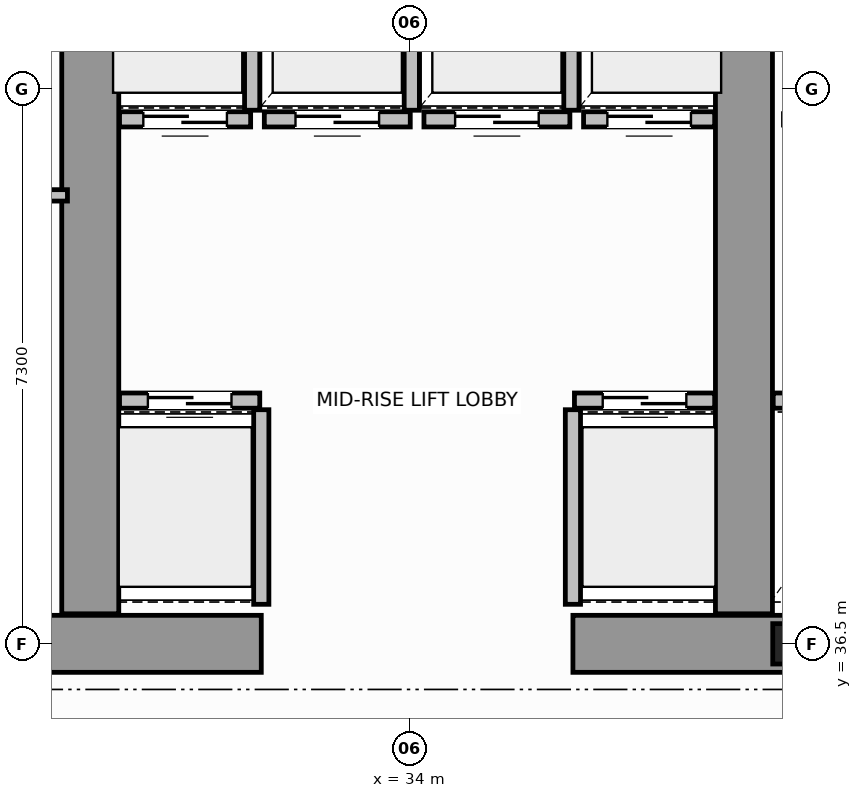
"""IFC4 building model, lengths in metres.
Left out: names, types, materials, properties, quantities, classifications, styles, units other than length and angle.
Written with IfcOpenShell. Run it as: python <this file> out.ifc"""

import sys

from ifc_helpers import new_model, si_unit, direction, frame, frame_2d, origin, origin_2d, place, context, subcontext, project, spatial, rectangle, i_section, extrude, source, transform, mapped, element, fill, save


model = new_model("IFC4")
c1 = context("Model", 3, precision=1e-05, world=origin(), true_north=direction((0.0, 1.0)))
c2 = subcontext(c1, "Body", "Model", "MODEL_VIEW")
j1 = project(units=[si_unit("LENGTHUNIT", "METRE"), si_unit("PLANEANGLEUNIT", "RADIAN")], contexts=[c1])
p1 = place(None, origin())
s1 = spatial("IfcSite", under=j1, at=p1, CompositionType="ELEMENT")
p2 = place(p1, origin())
s2 = spatial("IfcBuilding", under=s1, at=p2, CompositionType="ELEMENT")
p3 = place(p2, frame((0.0, 0.0, 137.6)))
s3 = spatial("IfcBuildingStorey", under=s2, at=p3, CompositionType="ELEMENT", Elevation=137.6)
m1 = source(origin(), c2, "Body", "SweptSolid", [
    extrude(i_section(OverallWidth=0.442, OverallDepth=0.531, WebThickness=0.065, FlangeThickness=0.076, FilletRadius=0.015, at=origin_2d()), origin(), (0.0, 0.0, 1.0), 3.8),
])
p4 = place(p3, frame((39.0, 36.5, 0.0), z_axis=(0.0, 0.0, 1.0), x_axis=(1.0, 0.0, 0.0)))
e1 = element("IfcColumn", 1, at=p4, inside=s3, PredefinedType="COLUMN", context=c2, shape_type="MappedRepresentation", body=[
    mapped(m1, transform((0.0, 0.0, 0.0), scale=1.0)),
])
for number, where, z_axis, x_axis in (
    (2, (27.55, 36.5, 0.0), (0.0, 0.0, 1.0), (1.0, 0.0, 0.0)),
    (3, (36.15, 36.5, 0.0), (0.0, 0.0, 1.0), (1.0, 0.0, 0.0)),
):
    element("IfcWall", number, at=place(p3, frame(where, z_axis=z_axis, x_axis=x_axis)), inside=s3, PredefinedType="SHEAR", context=c2, shape_type="SweptSolid", body=[
        extrude(rectangle(XDim=4.5, YDim=0.75, at=frame_2d((2.25, 0.0))), origin(), (0.0, 0.0, 1.0), 3.8),
    ])
for number, where, z_axis, x_axis in (
    (4, (29.8, 36.895, 0.0), (0.0, 0.0, 1.0), (0.0, 1.0, 0.0)),
    (5, (38.4, 36.895, 0.0), (0.0, 0.0, 1.0), (0.0, 1.0, 0.0)),
):
    element("IfcWall", number, at=place(p3, frame(where, z_axis=z_axis, x_axis=x_axis)), inside=s3, PredefinedType="SHEAR", context=c2, shape_type="SweptSolid", body=[
        extrude(rectangle(XDim=9.305, YDim=0.75, at=frame_2d((4.652, 0.0))), origin(), (0.0, 0.0, 1.0), 3.8),
    ])
p5 = place(p3, frame((30.185, 39.7, 0.0), z_axis=(0.0, 0.0, 1.0), x_axis=(1.0, 0.0, 0.0)))
e6 = element("IfcWall", 6, at=p5, inside=s3, PredefinedType="SOLIDWALL", context=c2, shape_type="SweptSolid", body=[
    extrude(rectangle(XDim=1.845, YDim=0.2, at=frame_2d((0.922, 0.0))), origin(), (0.0, 0.0, 1.0), 3.58),
])
p6 = place(p5, frame((0.373, 0.0, 0.0)))
e7 = element("IfcOpeningElement", 7, at=p6, cuts=e6, PredefinedType="OPENING", context=c2, shape_type="SweptSolid", body=[
    extrude(rectangle(XDim=1.1, YDim=2.15, at=frame_2d((0.55, 1.075))), frame((0.0, 0.11, 0.0), z_axis=(0.0, -1.0, 0.0), x_axis=(1.0, 0.0, 0.0)), (0.0, 0.0, 1.0), 0.22),
])
p7 = place(p3, frame((32.05, 37.02, 0.0), z_axis=(0.0, 0.0, 1.0), x_axis=(0.0, 1.0, 0.0)))
e8 = element("IfcWall", 8, at=p7, inside=s3, PredefinedType="SOLIDWALL", context=c2, shape_type="SweptSolid", body=[
    extrude(rectangle(XDim=2.56, YDim=0.2, at=frame_2d((1.28, 0.0))), origin(), (0.0, 0.0, 1.0), 3.58),
])
p8 = place(p3, frame((36.17, 39.7, 0.0), z_axis=(0.0, 0.0, 1.0), x_axis=(1.0, 0.0, 0.0)))
e9 = element("IfcWall", 9, at=p8, inside=s3, PredefinedType="SOLIDWALL", context=c2, shape_type="SweptSolid", body=[
    extrude(rectangle(XDim=1.845, YDim=0.2, at=frame_2d((0.922, 0.0))), origin(), (0.0, 0.0, 1.0), 3.58),
])
p9 = place(p8, frame((0.372, 0.0, 0.0)))
e10 = element("IfcOpeningElement", 10, at=p9, cuts=e9, PredefinedType="OPENING", context=c2, shape_type="SweptSolid", body=[
    extrude(rectangle(XDim=1.1, YDim=2.15, at=frame_2d((0.55, 1.075))), frame((0.0, 0.11, 0.0), z_axis=(0.0, -1.0, 0.0), x_axis=(1.0, 0.0, 0.0)), (0.0, 0.0, 1.0), 0.22),
])
p10 = place(p3, frame((36.15, 37.02, 0.0), z_axis=(0.0, 0.0, 1.0), x_axis=(0.0, 1.0, 0.0)))
e11 = element("IfcWall", 11, at=p10, inside=s3, PredefinedType="SOLIDWALL", context=c2, shape_type="SweptSolid", body=[
    extrude(rectangle(XDim=2.56, YDim=0.2, at=frame_2d((1.28, 0.0))), origin(), (0.0, 0.0, 1.0), 3.58),
])
p11 = place(p3, frame((30.185, 43.4, 0.0), z_axis=(0.0, 0.0, 1.0), x_axis=(1.0, 0.0, 0.0)))
e12 = element("IfcWall", 12, at=p11, inside=s3, PredefinedType="SOLIDWALL", context=c2, shape_type="SweptSolid", body=[
    extrude(rectangle(XDim=1.725, YDim=0.2, at=frame_2d((0.862, 0.0))), origin(), (0.0, 0.0, 1.0), 3.58),
])
p12 = place(p11, frame((0.313, 0.0, 0.0)))
e13 = element("IfcOpeningElement", 13, at=p12, cuts=e12, PredefinedType="OPENING", context=c2, shape_type="SweptSolid", body=[
    extrude(rectangle(XDim=1.1, YDim=2.15, at=frame_2d((0.55, 1.075))), frame((0.0, 0.11, 0.0), z_axis=(0.0, -1.0, 0.0), x_axis=(1.0, 0.0, 0.0)), (0.0, 0.0, 1.0), 0.22),
])
p13 = place(p3, frame((31.93, 43.52, 0.0), z_axis=(0.0, 0.0, 1.0), x_axis=(0.0, 1.0, 0.0)))
e14 = element("IfcWall", 14, at=p13, inside=s3, PredefinedType="SOLIDWALL", context=c2, shape_type="SweptSolid", body=[
    extrude(rectangle(XDim=2.56, YDim=0.2, at=frame_2d((1.28, 0.0))), origin(), (0.0, 0.0, 1.0), 3.58),
])
p14 = place(p3, frame((32.09, 43.4, 0.0), z_axis=(0.0, 0.0, 1.0), x_axis=(1.0, 0.0, 0.0)))
e15 = element("IfcWall", 15, at=p14, inside=s3, PredefinedType="SOLIDWALL", context=c2, shape_type="SweptSolid", body=[
    extrude(rectangle(XDim=1.92, YDim=0.2, at=frame_2d((0.96, 0.0))), origin(), (0.0, 0.0, 1.0), 3.58),
])
p15 = place(p14, frame((0.41, 0.0, 0.0)))
e16 = element("IfcOpeningElement", 16, at=p15, cuts=e15, PredefinedType="OPENING", context=c2, shape_type="SweptSolid", body=[
    extrude(rectangle(XDim=1.1, YDim=2.15, at=frame_2d((0.55, 1.075))), frame((0.0, 0.11, 0.0), z_axis=(0.0, -1.0, 0.0), x_axis=(1.0, 0.0, 0.0)), (0.0, 0.0, 1.0), 0.22),
])
p16 = place(p3, frame((34.03, 43.52, 0.0), z_axis=(0.0, 0.0, 1.0), x_axis=(0.0, 1.0, 0.0)))
e17 = element("IfcWall", 17, at=p16, inside=s3, PredefinedType="SOLIDWALL", context=c2, shape_type="SweptSolid", body=[
    extrude(rectangle(XDim=2.56, YDim=0.2, at=frame_2d((1.28, 0.0))), origin(), (0.0, 0.0, 1.0), 3.58),
])
p17 = place(p3, frame((34.19, 43.4, 0.0), z_axis=(0.0, 0.0, 1.0), x_axis=(1.0, 0.0, 0.0)))
e18 = element("IfcWall", 18, at=p17, inside=s3, PredefinedType="SOLIDWALL", context=c2, shape_type="SweptSolid", body=[
    extrude(rectangle(XDim=1.92, YDim=0.2, at=frame_2d((0.96, 0.0))), origin(), (0.0, 0.0, 1.0), 3.58),
])
p18 = place(p17, frame((0.41, 0.0, 0.0)))
e19 = element("IfcOpeningElement", 19, at=p18, cuts=e18, PredefinedType="OPENING", context=c2, shape_type="SweptSolid", body=[
    extrude(rectangle(XDim=1.1, YDim=2.15, at=frame_2d((0.55, 1.075))), frame((0.0, 0.11, 0.0), z_axis=(0.0, -1.0, 0.0), x_axis=(1.0, 0.0, 0.0)), (0.0, 0.0, 1.0), 0.22),
])
p19 = place(p3, frame((36.13, 43.52, 0.0), z_axis=(0.0, 0.0, 1.0), x_axis=(0.0, 1.0, 0.0)))
e20 = element("IfcWall", 20, at=p19, inside=s3, PredefinedType="SOLIDWALL", context=c2, shape_type="SweptSolid", body=[
    extrude(rectangle(XDim=2.56, YDim=0.2, at=frame_2d((1.28, 0.0))), origin(), (0.0, 0.0, 1.0), 3.58),
])
p20 = place(p3, frame((36.29, 43.4, 0.0), z_axis=(0.0, 0.0, 1.0), x_axis=(1.0, 0.0, 0.0)))
e21 = element("IfcWall", 21, at=p20, inside=s3, PredefinedType="SOLIDWALL", context=c2, shape_type="SweptSolid", body=[
    extrude(rectangle(XDim=1.725, YDim=0.2, at=frame_2d((0.862, 0.0))), origin(), (0.0, 0.0, 1.0), 3.58),
])
p21 = place(p20, frame((0.313, 0.0, 0.0)))
e22 = element("IfcOpeningElement", 22, at=p21, cuts=e21, PredefinedType="OPENING", context=c2, shape_type="SweptSolid", body=[
    extrude(rectangle(XDim=1.1, YDim=2.15, at=frame_2d((0.55, 1.075))), frame((0.0, 0.11, 0.0), z_axis=(0.0, -1.0, 0.0), x_axis=(1.0, 0.0, 0.0)), (0.0, 0.0, 1.0), 0.22),
])
p22 = place(p3, frame((38.785, 39.7, 0.0), z_axis=(0.0, 0.0, 1.0), x_axis=(1.0, 0.0, 0.0)))
e23 = element("IfcWall", 23, at=p22, inside=s3, PredefinedType="SOLIDWALL", context=c2, shape_type="SweptSolid", body=[
    extrude(rectangle(XDim=1.845, YDim=0.2, at=frame_2d((0.922, 0.0))), origin(), (0.0, 0.0, 1.0), 3.58),
])
p23 = place(p3, frame((21.5, 42.4, 0.0), z_axis=(0.0, 0.0, 1.0), x_axis=(1.0, 0.0, 0.0)))
e24 = element("IfcWall", 24, at=p23, inside=s3, PredefinedType="PARTITIONING", context=c2, shape_type="SweptSolid", body=[
    extrude(rectangle(XDim=8.0, YDim=0.15, at=frame_2d((4.0, 0.0))), origin(), (0.0, 0.0, 1.0), 3.58),
])
p24 = place(p23, frame((3.4, 0.0, 0.0)))
e25 = element("IfcOpeningElement", 25, at=p24, cuts=e24, PredefinedType="OPENING", context=c2, shape_type="SweptSolid", body=[
    extrude(rectangle(XDim=0.9, YDim=2.1, at=frame_2d((0.45, 1.05))), frame((0.0, 0.085, 0.0), z_axis=(0.0, -1.0, 0.0), x_axis=(1.0, 0.0, 0.0)), (0.0, 0.0, 1.0), 0.17),
])
m2 = source(origin(), c2, "Body", "SweptSolid", [
    extrude(rectangle(XDim=1.1, YDim=2.15, at=frame_2d((0.55, 1.075))), frame((0.0, 0.025, 0.0), z_axis=(0.0, -1.0, 0.0), x_axis=(1.0, 0.0, 0.0)), (0.0, 0.0, 1.0), 0.05),
])
p25 = place(p6, origin())
e26 = element("IfcDoor", 26, at=p25, inside=s3, OperationType="DOUBLE_DOOR_SLIDING", PredefinedType="DOOR", context=c2, shape_type="MappedRepresentation", body=[
    mapped(m2, transform((0.0, 0.0, 0.0), scale=1.0)),
])
fill(e7, e26)
p26 = place(p9, origin())
e27 = element("IfcDoor", 27, at=p26, inside=s3, OperationType="DOUBLE_DOOR_SLIDING", PredefinedType="DOOR", context=c2, shape_type="MappedRepresentation", body=[
    mapped(m2, transform((0.0, 0.0, 0.0), scale=1.0)),
])
fill(e10, e27)
p27 = place(p12, origin())
e28 = element("IfcDoor", 28, at=p27, inside=s3, OperationType="DOUBLE_DOOR_SLIDING", PredefinedType="DOOR", context=c2, shape_type="MappedRepresentation", body=[
    mapped(m2, transform((0.0, 0.0, 0.0), scale=1.0)),
])
fill(e13, e28)
p28 = place(p15, origin())
e29 = element("IfcDoor", 29, at=p28, inside=s3, OperationType="DOUBLE_DOOR_SLIDING", PredefinedType="DOOR", context=c2, shape_type="MappedRepresentation", body=[
    mapped(m2, transform((0.0, 0.0, 0.0), scale=1.0)),
])
fill(e16, e29)
p29 = place(p18, origin())
e30 = element("IfcDoor", 30, at=p29, inside=s3, OperationType="DOUBLE_DOOR_SLIDING", PredefinedType="DOOR", context=c2, shape_type="MappedRepresentation", body=[
    mapped(m2, transform((0.0, 0.0, 0.0), scale=1.0)),
])
fill(e19, e30)
p30 = place(p21, origin())
e31 = element("IfcDoor", 31, at=p30, inside=s3, OperationType="DOUBLE_DOOR_SLIDING", PredefinedType="DOOR", context=c2, shape_type="MappedRepresentation", body=[
    mapped(m2, transform((0.0, 0.0, 0.0), scale=1.0)),
])
fill(e22, e31)
save(model, sys.argv[1])
